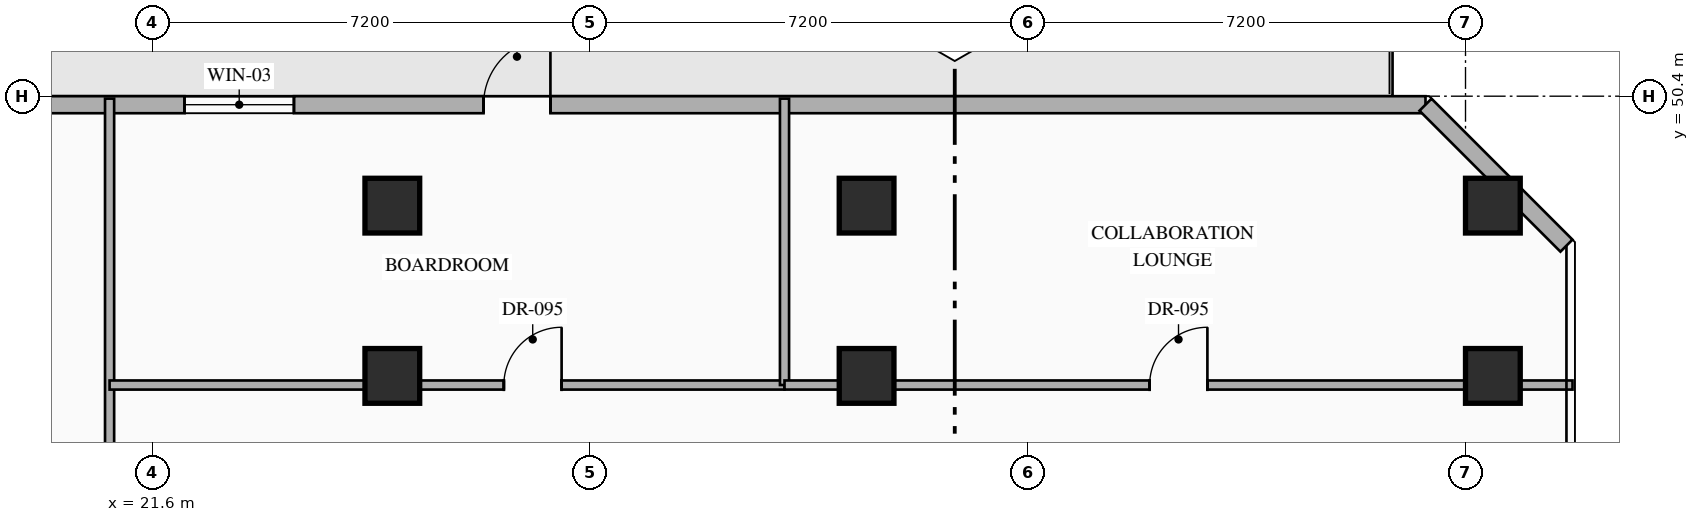
"""IFC4 building model, lengths in metres.
Left out: names, types, materials, properties, quantities, classifications, styles, units other than length and angle.
Written with IfcOpenShell. Run it as: python <this file> out.ifc"""

import sys

from ifc_helpers import new_model, si_unit, direction, frame, frame_2d, origin, origin_2d, place, context, subcontext, project, spatial, rectangle, hollow_rectangle, extrude, element, fill, save


model = new_model("IFC4")
c1 = context("Model", 3, precision=1e-05, world=origin(), true_north=direction((0.0, 1.0)))
c2 = subcontext(c1, "Body", "Model", "MODEL_VIEW")
j1 = project(units=[si_unit("LENGTHUNIT", "METRE"), si_unit("PLANEANGLEUNIT", "RADIAN")], contexts=[c1])
p1 = place(None, origin())
s1 = spatial("IfcSite", under=j1, at=p1, CompositionType="ELEMENT")
p2 = place(p1, origin())
s2 = spatial("IfcBuilding", under=s1, at=p2, CompositionType="ELEMENT")
p3 = place(p2, frame((0.0, 0.0, 96.45)))
s3 = spatial("IfcBuildingStorey", under=s2, at=p3, CompositionType="ELEMENT", Elevation=96.45)
for number, where, z_axis, x_axis in (
    (1, (25.55, 45.8, 0.0), (0.0, 0.0, 1.0), (1.0, 0.0, 0.0)),
    (2, (33.35, 45.8, 0.0), (0.0, 0.0, 1.0), (1.0, 0.0, 0.0)),
    (3, (43.65, 45.8, 0.0), (0.0, 0.0, 1.0), (1.0, 0.0, 0.0)),
    (4, (25.55, 48.6, 0.0), (0.0, 0.0, 1.0), (1.0, 0.0, 0.0)),
    (5, (33.35, 48.6, 0.0), (0.0, 0.0, 1.0), (1.0, 0.0, 0.0)),
    (6, (43.65, 48.6, 0.0), (0.0, 0.0, 1.0), (1.0, 0.0, 0.0)),
):
    element("IfcColumn", number, at=place(p3, frame(where, z_axis=z_axis, x_axis=x_axis)), inside=s3, PredefinedType="COLUMN", context=c2, shape_type="SweptSolid", body=[
        extrude(hollow_rectangle(XDim=0.9, YDim=0.9, WallThickness=0.036, at=origin_2d()), origin(), (0.0, 0.0, 1.0), 4.8),
    ])
p4 = place(p3, frame((12.058, 50.26, 0.0), z_axis=(0.0, 0.0, 1.0), x_axis=(1.0, 0.0, 0.0)))
e7 = element("IfcWall", 7, at=p4, inside=s3, PredefinedType="STANDARD", context=c2, shape_type="SweptSolid", body=[
    extrude(rectangle(XDim=30.484, YDim=0.28, at=frame_2d((15.242, 0.0))), origin(), (0.0, 0.0, 1.0), 4.55),
])
p5 = place(p4, frame((14.992, 0.0, 0.0)))
e8 = element("IfcOpeningElement", 8, at=p5, cuts=e7, PredefinedType="OPENING", context=c2, shape_type="SweptSolid", body=[
    extrude(rectangle(XDim=1.1, YDim=2.2, at=frame_2d((0.55, 1.1))), frame((0.0, 0.15, 0.0), z_axis=(0.0, -1.0, 0.0), x_axis=(1.0, 0.0, 0.0)), (0.0, 0.0, 1.0), 0.3),
])
p6 = place(p4, frame((10.074, 0.0, 0.85)))
e9 = element("IfcOpeningElement", 9, at=p6, cuts=e7, PredefinedType="OPENING", context=c2, shape_type="SweptSolid", body=[
    extrude(rectangle(XDim=1.8, YDim=2.1, at=frame_2d((0.9, 1.05))), frame((0.0, 0.15, 0.0), z_axis=(0.0, -1.0, 0.0), x_axis=(1.0, 0.0, 0.0)), (0.0, 0.0, 1.0), 0.3),
])
p7 = place(p3, frame((42.542, 50.26, 0.0), z_axis=(0.0, 0.0, 1.0), x_axis=(0.707106781187, -0.707106781187, 0.0)))
e10 = element("IfcWall", 10, at=p7, inside=s3, PredefinedType="STANDARD", context=c2, shape_type="SweptSolid", body=[
    extrude(rectangle(XDim=3.278, YDim=0.28, at=frame_2d((1.639, 0.0))), origin(), (0.0, 0.0, 1.0), 4.55),
])
p8 = place(p3, frame((20.9, 35.4, 0.0), z_axis=(0.0, 0.0, 1.0), x_axis=(0.0, 1.0, 0.0)))
e11 = element("IfcWall", 11, at=p8, inside=s3, PredefinedType="PARTITIONING", context=c2, shape_type="SweptSolid", body=[
    extrude(rectangle(XDim=14.96, YDim=0.15, at=frame_2d((7.48, 0.0))), origin(), (0.0, 0.0, 1.0), 4.55),
])
p9 = place(p8, frame((7.667, 0.0, 0.0)))
e12 = element("IfcOpeningElement", 12, at=p9, cuts=e11, PredefinedType="OPENING", context=c2, shape_type="SweptSolid", body=[
    extrude(rectangle(XDim=0.95, YDim=2.15, at=frame_2d((0.475, 1.075))), frame((0.0, 0.085, 0.0), z_axis=(0.0, -1.0, 0.0), x_axis=(1.0, 0.0, 0.0)), (0.0, 0.0, 1.0), 0.17),
])
p10 = place(p3, frame((20.9, 45.65, 0.0), z_axis=(0.0, 0.0, 1.0), x_axis=(1.0, 0.0, 0.0)))
e13 = element("IfcWall", 13, at=p10, inside=s3, PredefinedType="PARTITIONING", context=c2, shape_type="SweptSolid", body=[
    extrude(rectangle(XDim=11.1, YDim=0.15, at=frame_2d((5.55, 0.0))), origin(), (0.0, 0.0, 1.0), 3.745),
])
p11 = place(p10, frame((6.484, 0.0, 0.0)))
e14 = element("IfcOpeningElement", 14, at=p11, cuts=e13, PredefinedType="OPENING", context=c2, shape_type="SweptSolid", body=[
    extrude(rectangle(XDim=0.95, YDim=2.15, at=frame_2d((0.475, 1.075))), frame((0.0, 0.085, 0.0), z_axis=(0.0, -1.0, 0.0), x_axis=(1.0, 0.0, 0.0)), (0.0, 0.0, 1.0), 0.17),
])
p12 = place(p3, frame((32.0, 45.65, 0.0), z_axis=(0.0, 0.0, 1.0), x_axis=(0.0, 1.0, 0.0)))
e15 = element("IfcWall", 15, at=p12, inside=s3, PredefinedType="PARTITIONING", context=c2, shape_type="SweptSolid", body=[
    extrude(rectangle(XDim=4.71, YDim=0.15, at=frame_2d((2.355, 0.0))), origin(), (0.0, 0.0, 1.0), 4.55),
])
p13 = place(p3, frame((32.0, 45.65, 0.0), z_axis=(0.0, 0.0, 1.0), x_axis=(1.0, 0.0, 0.0)))
e16 = element("IfcWall", 16, at=p13, inside=s3, PredefinedType="PARTITIONING", context=c2, shape_type="SweptSolid", body=[
    extrude(rectangle(XDim=12.96, YDim=0.15, at=frame_2d((6.48, 0.0))), origin(), (0.0, 0.0, 1.0), 3.745),
])
p14 = place(p13, frame((6.005, 0.0, 0.0)))
e17 = element("IfcOpeningElement", 17, at=p14, cuts=e16, PredefinedType="OPENING", context=c2, shape_type="SweptSolid", body=[
    extrude(rectangle(XDim=0.95, YDim=2.15, at=frame_2d((0.475, 1.075))), frame((0.0, 0.085, 0.0), z_axis=(0.0, -1.0, 0.0), x_axis=(1.0, 0.0, 0.0)), (0.0, 0.0, 1.0), 0.17),
])
p15 = place(p5, origin())
e18 = element("IfcDoor", 18, at=p15, inside=s3, OperationType="SINGLE_SWING_RIGHT", PredefinedType="DOOR", context=c2, shape_type="SweptSolid", body=[
    extrude(rectangle(XDim=1.1, YDim=2.2, at=frame_2d((0.55, 1.1))), frame((0.0, 0.025, 0.0), z_axis=(0.0, -1.0, 0.0), x_axis=(1.0, 0.0, 0.0)), (0.0, 0.0, 1.0), 0.05),
])
fill(e8, e18)
p16 = place(p6, origin())
e19 = element("IfcWindow", 19, at=p16, inside=s3, PartitioningType="SINGLE_PANEL", PredefinedType="WINDOW", context=c2, shape_type="SweptSolid", body=[
    extrude(rectangle(XDim=1.8, YDim=2.1, at=frame_2d((0.9, 1.05))), frame((0.0, 0.03, 0.0), z_axis=(0.0, -1.0, 0.0), x_axis=(1.0, 0.0, 0.0)), (0.0, 0.0, 1.0), 0.06),
])
fill(e9, e19)
p17 = place(p11, origin())
e20 = element("IfcDoor", 20, at=p17, inside=s3, OperationType="SINGLE_SWING_RIGHT", PredefinedType="DOOR", context=c2, shape_type="SweptSolid", body=[
    extrude(rectangle(XDim=0.95, YDim=2.15, at=frame_2d((0.475, 1.075))), frame((0.0, 0.025, 0.0), z_axis=(0.0, -1.0, 0.0), x_axis=(1.0, 0.0, 0.0)), (0.0, 0.0, 1.0), 0.05),
])
fill(e14, e20)
p18 = place(p14, origin())
e21 = element("IfcDoor", 21, at=p18, inside=s3, OperationType="SINGLE_SWING_RIGHT", PredefinedType="DOOR", context=c2, shape_type="SweptSolid", body=[
    extrude(rectangle(XDim=0.95, YDim=2.15, at=frame_2d((0.475, 1.075))), frame((0.0, 0.025, 0.0), z_axis=(0.0, -1.0, 0.0), x_axis=(1.0, 0.0, 0.0)), (0.0, 0.0, 1.0), 0.05),
])
fill(e17, e21)
save(model, sys.argv[1])
